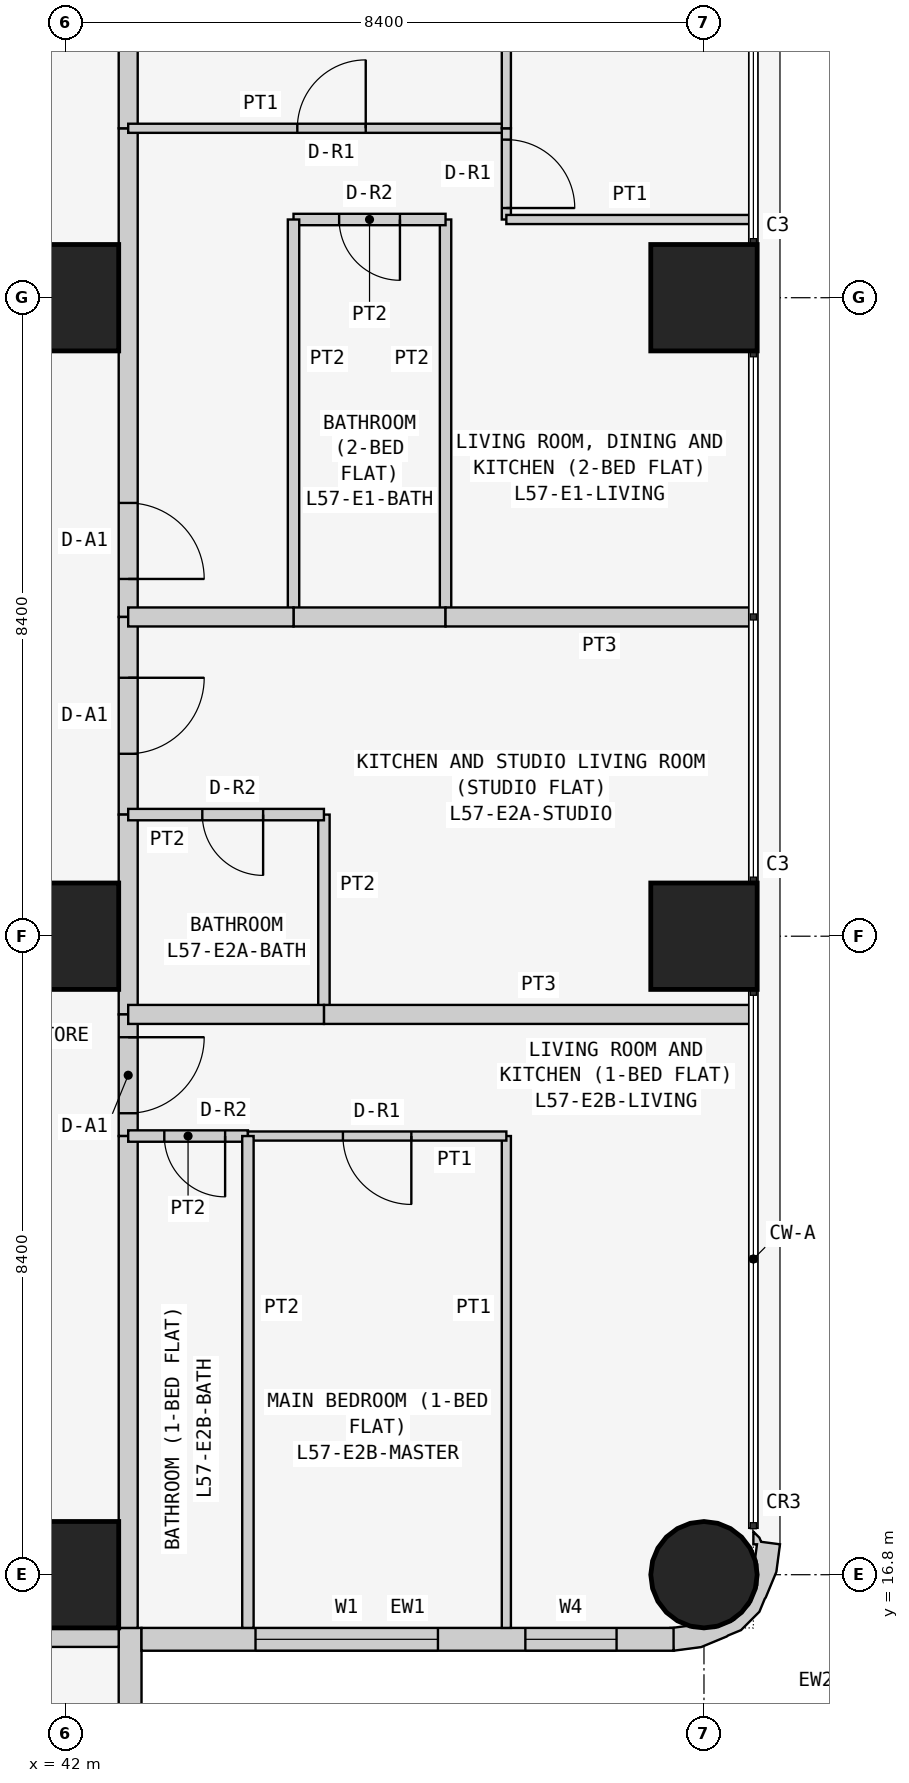
"""IFC4 building model, lengths in metres.
Left out: names, types, materials, properties, quantities, classifications, styles, units other than length and angle.
Written with IfcOpenShell. Run it as: python <this file> out.ifc"""

import sys

from ifc_helpers import new_model, si_unit, direction, frame, frame_2d, origin, origin_2d, place, context, subcontext, project, spatial, polyline, rectangle, circle, outline, extrude, element, fill, save


model = new_model("IFC4")
c1 = context("Model", 3, precision=1e-05, world=origin(), true_north=direction((0.0, 1.0)))
c2 = subcontext(c1, "Body", "Model", "MODEL_VIEW")
j1 = project(units=[si_unit("LENGTHUNIT", "METRE"), si_unit("PLANEANGLEUNIT", "RADIAN")], contexts=[c1])
p1 = place(None, origin())
s1 = spatial("IfcSite", under=j1, at=p1, CompositionType="ELEMENT")
p2 = place(p1, origin())
s2 = spatial("IfcBuilding", under=s1, at=p2, CompositionType="ELEMENT")
p3 = place(p2, frame((0.0, 0.0, 219.3)))
s3 = spatial("IfcBuildingStorey", under=s2, at=p3, CompositionType="ELEMENT", Elevation=219.3)
for number, where, z_axis, x_axis in (
    (1, (42.0, 16.8, 0.0), (0.0, 0.0, 1.0), (1.0, 0.0, 0.0)),
    (2, (42.0, 25.2, 0.0), (0.0, 0.0, 1.0), (1.0, 0.0, 0.0)),
    (3, (42.0, 33.6, 0.0), (0.0, 0.0, 1.0), (1.0, 0.0, 0.0)),
):
    element("IfcColumn", number, at=place(p3, frame(where, z_axis=z_axis, x_axis=x_axis)), inside=s3, PredefinedType="COLUMN", context=c2, shape_type="SweptSolid", body=[
        extrude(rectangle(XDim=1.4, YDim=1.4, at=origin_2d()), origin(), (0.0, 0.0, 1.0), 3.6),
    ])
p4 = place(p3, frame((50.4, 16.8, 0.0), z_axis=(0.0, 0.0, 1.0), x_axis=(1.0, 0.0, 0.0)))
e4 = element("IfcColumn", 4, at=p4, inside=s3, PredefinedType="COLUMN", context=c2, shape_type="SweptSolid", body=[
    extrude(circle(Radius=0.7, at=origin_2d()), origin(), (0.0, 0.0, 1.0), 3.6),
])
for number, where, z_axis, x_axis in (
    (5, (50.4, 25.2, 0.0), (0.0, 0.0, 1.0), (1.0, 0.0, 0.0)),
    (6, (50.4, 33.6, 0.0), (0.0, 0.0, 1.0), (1.0, 0.0, 0.0)),
):
    element("IfcColumn", number, at=place(p3, frame(where, z_axis=z_axis, x_axis=x_axis)), inside=s3, PredefinedType="COLUMN", context=c2, shape_type="SweptSolid", body=[
        extrude(rectangle(XDim=1.4, YDim=1.4, at=origin_2d()), origin(), (0.0, 0.0, 1.0), 3.6),
    ])
p5 = place(p3, frame((42.85, 8.8, 0.0), z_axis=(0.0, 0.0, 1.0), x_axis=(0.0, 1.0, 0.0)))
e7 = element("IfcWall", 7, at=p5, inside=s3, PredefinedType="SOLIDWALL", context=c2, shape_type="SweptSolid", body=[
    extrude(rectangle(XDim=7.3, YDim=0.3, at=frame_2d((3.65, 0.0))), origin(), (0.0, 0.0, 1.0), 3.45),
])
p6 = place(p5, frame((3.1, 0.0, 0.9)))
e8 = element("IfcOpeningElement", 8, at=p6, cuts=e7, PredefinedType="OPENING", context=c2, shape_type="SweptSolid", body=[
    extrude(rectangle(XDim=2.4, YDim=1.5, at=frame_2d((1.2, 0.75))), frame((0.0, 0.16, 0.0), z_axis=(0.0, -1.0, 0.0), x_axis=(1.0, 0.0, 0.0)), (0.0, 0.0, 1.0), 0.32),
])
p7 = place(p5, frame((0.75, 0.0, 0.9)))
e9 = element("IfcOpeningElement", 9, at=p7, cuts=e7, PredefinedType="OPENING", context=c2, shape_type="SweptSolid", body=[
    extrude(rectangle(XDim=1.2, YDim=1.5, at=frame_2d((0.6, 0.75))), frame((0.0, 0.16, 0.0), z_axis=(0.0, -1.0, 0.0), x_axis=(1.0, 0.0, 0.0)), (0.0, 0.0, 1.0), 0.32),
])
p8 = place(p3, frame((43.0, 15.95, 0.0), z_axis=(0.0, 0.0, 1.0), x_axis=(1.0, 0.0, 0.0)))
e10 = element("IfcWall", 10, at=p8, inside=s3, PredefinedType="SOLIDWALL", context=c2, shape_type="SweptSolid", body=[
    extrude(rectangle(XDim=7.0, YDim=0.3, at=frame_2d((3.5, 0.0))), origin(), (0.0, 0.0, 1.0), 3.45),
])
p9 = place(p8, frame((1.5, 0.0, 0.9)))
e11 = element("IfcOpeningElement", 11, at=p9, cuts=e10, PredefinedType="OPENING", context=c2, shape_type="SweptSolid", body=[
    extrude(rectangle(XDim=2.4, YDim=1.5, at=frame_2d((1.2, 0.75))), frame((0.0, 0.16, 0.0), z_axis=(0.0, -1.0, 0.0), x_axis=(1.0, 0.0, 0.0)), (0.0, 0.0, 1.0), 0.32),
])
p10 = place(p8, frame((5.05, 0.0, 0.9)))
e12 = element("IfcOpeningElement", 12, at=p10, cuts=e10, PredefinedType="OPENING", context=c2, shape_type="SweptSolid", body=[
    extrude(rectangle(XDim=1.2, YDim=1.5, at=frame_2d((0.6, 0.75))), frame((0.0, 0.16, 0.0), z_axis=(0.0, -1.0, 0.0), x_axis=(1.0, 0.0, 0.0)), (0.0, 0.0, 1.0), 0.32),
])
p11 = place(p3, frame((50.11, 16.076, 0.0), z_axis=(0.0, 0.0, 1.0), x_axis=(0.898030234854, -0.439933741929, 0.0)))
e13 = element("IfcWall", 13, at=p11, inside=s3, PredefinedType="SOLIDWALL", context=c2, shape_type="SweptSolid", body=[
    extrude(outline(polyline([(0.664, 1.577), (0.426, 1.497), (0.382, 1.536), (0.276, 1.572), (0.349, 1.423), (0.392, 1.444), (0.453, 1.261), (0.51, 1.211), (0.632, 0.961), (0.65, 0.683), (0.56, 0.419), (0.375, 0.21), (0.125, 0.087), (0.05, 0.082), (-0.128, -0.035), (-0.145, -0.044), (0.022, -0.296), (0.327, -0.094), (0.568, 0.18), (0.577, 0.199), (0.7, 0.337), (0.811, 0.661), (0.799, 0.846), (0.803, 0.866), (0.78, 1.231), (0.664, 1.577)])), origin(), (0.0, 0.0, 1.0), 3.45),
])
p12 = place(p3, frame((42.825, 35.829, 0.0), z_axis=(0.0, 0.0, 1.0), x_axis=(0.0, -1.0, 0.0)))
e14 = element("IfcWall", 14, at=p12, inside=s3, PredefinedType="PARTITIONING", context=c2, shape_type="SweptSolid", body=[
    extrude(rectangle(XDim=6.429, YDim=0.25, at=frame_2d((3.215, 0.0))), origin(), (0.0, 0.0, 1.0), 3.45),
])
p13 = place(p12, frame((4.929, 0.0, 0.0)))
e15 = element("IfcOpeningElement", 15, at=p13, cuts=e14, PredefinedType="OPENING", context=c2, shape_type="SweptSolid", body=[
    extrude(rectangle(XDim=1.0, YDim=2.1, at=frame_2d((0.5, 1.05))), frame((0.0, 0.135, 0.0), z_axis=(0.0, -1.0, 0.0), x_axis=(1.0, 0.0, 0.0)), (0.0, 0.0, 1.0), 0.27),
])
p14 = place(p3, frame((42.825, 42.7, 0.0), z_axis=(0.0, 0.0, 1.0), x_axis=(0.0, -1.0, 0.0)))
e16 = element("IfcWall", 16, at=p14, inside=s3, PredefinedType="PARTITIONING", context=c2, shape_type="SweptSolid", body=[
    extrude(rectangle(XDim=6.871, YDim=0.25, at=frame_2d((3.436, 0.0))), origin(), (0.0, 0.0, 1.0), 3.45),
])
p15 = place(p3, frame((42.825, 29.4, 0.0), z_axis=(0.0, 0.0, 1.0), x_axis=(0.0, -1.0, 0.0)))
e17 = element("IfcWall", 17, at=p15, inside=s3, PredefinedType="PARTITIONING", context=c2, shape_type="SweptSolid", body=[
    extrude(rectangle(XDim=2.6, YDim=0.25, at=frame_2d((1.3, 0.0))), origin(), (0.0, 0.0, 1.0), 3.45),
])
p16 = place(p15, frame((0.8, 0.0, 0.0)))
e18 = element("IfcOpeningElement", 18, at=p16, cuts=e17, PredefinedType="OPENING", context=c2, shape_type="SweptSolid", body=[
    extrude(rectangle(XDim=1.0, YDim=2.1, at=frame_2d((0.5, 1.05))), frame((0.0, 0.135, 0.0), z_axis=(0.0, -1.0, 0.0), x_axis=(1.0, 0.0, 0.0)), (0.0, 0.0, 1.0), 0.27),
])
p17 = place(p3, frame((42.825, 26.8, 0.0), z_axis=(0.0, 0.0, 1.0), x_axis=(0.0, -1.0, 0.0)))
e19 = element("IfcWall", 19, at=p17, inside=s3, PredefinedType="PARTITIONING", context=c2, shape_type="SweptSolid", body=[
    extrude(rectangle(XDim=2.629, YDim=0.25, at=frame_2d((1.314, 0.0))), origin(), (0.0, 0.0, 1.0), 3.45),
])
p18 = place(p3, frame((42.825, 24.171, 0.0), z_axis=(0.0, 0.0, 1.0), x_axis=(0.0, -1.0, 0.0)))
e20 = element("IfcWall", 20, at=p18, inside=s3, PredefinedType="PARTITIONING", context=c2, shape_type="SweptSolid", body=[
    extrude(rectangle(XDim=1.6, YDim=0.25, at=frame_2d((0.8, 0.0))), origin(), (0.0, 0.0, 1.0), 3.45),
])
p19 = place(p18, frame((0.3, 0.0, 0.0)))
e21 = element("IfcOpeningElement", 21, at=p19, cuts=e20, PredefinedType="OPENING", context=c2, shape_type="SweptSolid", body=[
    extrude(rectangle(XDim=1.0, YDim=2.1, at=frame_2d((0.5, 1.05))), frame((0.0, 0.135, 0.0), z_axis=(0.0, -1.0, 0.0), x_axis=(1.0, 0.0, 0.0)), (0.0, 0.0, 1.0), 0.27),
])
p20 = place(p3, frame((42.825, 22.571, 0.0), z_axis=(0.0, 0.0, 1.0), x_axis=(0.0, -1.0, 0.0)))
e22 = element("IfcWall", 22, at=p20, inside=s3, PredefinedType="PARTITIONING", context=c2, shape_type="SweptSolid", body=[
    extrude(rectangle(XDim=6.471, YDim=0.25, at=frame_2d((3.235, 0.0))), origin(), (0.0, 0.0, 1.0), 3.45),
])
p21 = place(p3, frame((42.7, 15.975, 0.0), z_axis=(0.0, 0.0, 1.0), x_axis=(-1.0, 0.0, 0.0)))
e23 = element("IfcWall", 23, at=p21, inside=s3, PredefinedType="PARTITIONING", context=c2, shape_type="SweptSolid", body=[
    extrude(rectangle(XDim=6.871, YDim=0.25, at=frame_2d((3.436, 0.0))), origin(), (0.0, 0.0, 1.0), 3.45),
])
p22 = place(p3, frame((47.0, 29.4, 0.0), z_axis=(0.0, 0.0, 1.0), x_axis=(0.0, 1.0, 0.0)))
e24 = element("IfcWall", 24, at=p22, inside=s3, PredefinedType="PARTITIONING", context=c2, shape_type="SweptSolid", body=[
    extrude(rectangle(XDim=5.229, YDim=0.15, at=frame_2d((2.615, 0.0))), origin(), (0.0, 0.0, 1.0), 3.45),
])
p23 = place(p3, frame((47.0, 34.629, 0.0), z_axis=(0.0, 0.0, 1.0), x_axis=(-1.0, 0.0, 0.0)))
e25 = element("IfcWall", 25, at=p23, inside=s3, PredefinedType="PARTITIONING", context=c2, shape_type="SweptSolid", body=[
    extrude(rectangle(XDim=2.0, YDim=0.15, at=frame_2d((1.0, 0.0))), origin(), (0.0, 0.0, 1.0), 3.45),
])
p24 = place(p23, frame((0.6, 0.0, 0.0)))
e26 = element("IfcOpeningElement", 26, at=p24, cuts=e25, PredefinedType="OPENING", context=c2, shape_type="SweptSolid", body=[
    extrude(rectangle(XDim=0.8, YDim=2.1, at=frame_2d((0.4, 1.05))), frame((0.0, 0.085, 0.0), z_axis=(0.0, -1.0, 0.0), x_axis=(1.0, 0.0, 0.0)), (0.0, 0.0, 1.0), 0.17),
])
p25 = place(p3, frame((45.0, 34.629, 0.0), z_axis=(0.0, 0.0, 1.0), x_axis=(0.0, -1.0, 0.0)))
e27 = element("IfcWall", 27, at=p25, inside=s3, PredefinedType="PARTITIONING", context=c2, shape_type="SweptSolid", body=[
    extrude(rectangle(XDim=5.229, YDim=0.15, at=frame_2d((2.615, 0.0))), origin(), (0.0, 0.0, 1.0), 3.45),
])
p26 = place(p3, frame((45.0, 29.4, 0.0), z_axis=(0.0, 0.0, 1.0), x_axis=(1.0, 0.0, 0.0)))
e28 = element("IfcWall", 28, at=p26, inside=s3, PredefinedType="PARTITIONING", context=c2, shape_type="SweptSolid", body=[
    extrude(rectangle(XDim=2.0, YDim=0.25, at=frame_2d((1.0, 0.0))), origin(), (0.0, 0.0, 1.0), 3.45),
])
p27 = place(p3, frame((42.825, 35.829, 0.0), z_axis=(0.0, 0.0, 1.0), x_axis=(1.0, 0.0, 0.0)))
e29 = element("IfcWall", 29, at=p27, inside=s3, PredefinedType="PARTITIONING", context=c2, shape_type="SweptSolid", body=[
    extrude(rectangle(XDim=4.975, YDim=0.12, at=frame_2d((2.488, 0.0))), origin(), (0.0, 0.0, 1.0), 3.45),
])
p28 = place(p27, frame((2.225, 0.0, 0.0)))
e30 = element("IfcOpeningElement", 30, at=p28, cuts=e29, PredefinedType="OPENING", context=c2, shape_type="SweptSolid", body=[
    extrude(rectangle(XDim=0.9, YDim=2.1, at=frame_2d((0.45, 1.05))), frame((0.0, 0.07, 0.0), z_axis=(0.0, -1.0, 0.0), x_axis=(1.0, 0.0, 0.0)), (0.0, 0.0, 1.0), 0.14),
])
p29 = place(p3, frame((47.8, 35.829, 0.0), z_axis=(0.0, 0.0, 1.0), x_axis=(0.0, -1.0, 0.0)))
e31 = element("IfcWall", 31, at=p29, inside=s3, PredefinedType="PARTITIONING", context=c2, shape_type="SweptSolid", body=[
    extrude(rectangle(XDim=1.2, YDim=0.12, at=frame_2d((0.6, 0.0))), origin(), (0.0, 0.0, 1.0), 3.45),
])
p30 = place(p29, frame((0.149, 0.0, 0.0)))
e32 = element("IfcOpeningElement", 32, at=p30, cuts=e31, PredefinedType="OPENING", context=c2, shape_type="SweptSolid", body=[
    extrude(rectangle(XDim=0.9, YDim=2.1, at=frame_2d((0.45, 1.05))), frame((0.0, 0.07, 0.0), z_axis=(0.0, -1.0, 0.0), x_axis=(1.0, 0.0, 0.0)), (0.0, 0.0, 1.0), 0.14),
])
p31 = place(p3, frame((47.8, 34.629, 0.0), z_axis=(0.0, 0.0, 1.0), x_axis=(1.0, 0.0, 0.0)))
e33 = element("IfcWall", 33, at=p31, inside=s3, PredefinedType="PARTITIONING", context=c2, shape_type="SweptSolid", body=[
    extrude(rectangle(XDim=3.25, YDim=0.12, at=frame_2d((1.625, 0.0))), origin(), (0.0, 0.0, 1.0), 3.45),
])
p32 = place(p3, frame((45.0, 29.4, 0.0), z_axis=(0.0, 0.0, 1.0), x_axis=(-1.0, 0.0, 0.0)))
e34 = element("IfcWall", 34, at=p32, inside=s3, PredefinedType="PARTITIONING", context=c2, shape_type="SweptSolid", body=[
    extrude(rectangle(XDim=2.175, YDim=0.25, at=frame_2d((1.087, 0.0))), origin(), (0.0, 0.0, 1.0), 3.45),
])
p33 = place(p3, frame((51.05, 29.4, 0.0), z_axis=(0.0, 0.0, 1.0), x_axis=(-1.0, 0.0, 0.0)))
e35 = element("IfcWall", 35, at=p33, inside=s3, PredefinedType="PARTITIONING", context=c2, shape_type="SweptSolid", body=[
    extrude(rectangle(XDim=4.05, YDim=0.25, at=frame_2d((2.025, 0.0))), origin(), (0.0, 0.0, 1.0), 3.45),
])
p34 = place(p3, frame((47.8, 35.829, 0.0), z_axis=(0.0, 0.0, 1.0), x_axis=(0.0, 1.0, 0.0)))
e36 = element("IfcWall", 36, at=p34, inside=s3, PredefinedType="PARTITIONING", context=c2, shape_type="SweptSolid", body=[
    extrude(rectangle(XDim=6.871, YDim=0.12, at=frame_2d((3.436, 0.0))), origin(), (0.0, 0.0, 1.0), 3.45),
])
p35 = place(p3, frame((45.4, 24.171, 0.0), z_axis=(0.0, 0.0, 1.0), x_axis=(0.0, 1.0, 0.0)))
e37 = element("IfcWall", 37, at=p35, inside=s3, PredefinedType="PARTITIONING", context=c2, shape_type="SweptSolid", body=[
    extrude(rectangle(XDim=2.629, YDim=0.15, at=frame_2d((1.314, 0.0))), origin(), (0.0, 0.0, 1.0), 3.45),
])
p36 = place(p3, frame((45.4, 26.8, 0.0), z_axis=(0.0, 0.0, 1.0), x_axis=(-1.0, 0.0, 0.0)))
e38 = element("IfcWall", 38, at=p36, inside=s3, PredefinedType="PARTITIONING", context=c2, shape_type="SweptSolid", body=[
    extrude(rectangle(XDim=2.575, YDim=0.15, at=frame_2d((1.288, 0.0))), origin(), (0.0, 0.0, 1.0), 3.45),
])
p37 = place(p36, frame((0.8, 0.0, 0.0)))
e39 = element("IfcOpeningElement", 39, at=p37, cuts=e38, PredefinedType="OPENING", context=c2, shape_type="SweptSolid", body=[
    extrude(rectangle(XDim=0.8, YDim=2.1, at=frame_2d((0.4, 1.05))), frame((0.0, 0.085, 0.0), z_axis=(0.0, -1.0, 0.0), x_axis=(1.0, 0.0, 0.0)), (0.0, 0.0, 1.0), 0.17),
])
p38 = place(p3, frame((51.05, 24.171, 0.0), z_axis=(0.0, 0.0, 1.0), x_axis=(-1.0, 0.0, 0.0)))
e40 = element("IfcWall", 40, at=p38, inside=s3, PredefinedType="PARTITIONING", context=c2, shape_type="SweptSolid", body=[
    extrude(rectangle(XDim=5.65, YDim=0.25, at=frame_2d((2.825, 0.0))), origin(), (0.0, 0.0, 1.0), 3.45),
])
p39 = place(p3, frame((45.4, 24.171, 0.0), z_axis=(0.0, 0.0, 1.0), x_axis=(-1.0, 0.0, 0.0)))
e41 = element("IfcWall", 41, at=p39, inside=s3, PredefinedType="PARTITIONING", context=c2, shape_type="SweptSolid", body=[
    extrude(rectangle(XDim=2.575, YDim=0.25, at=frame_2d((1.288, 0.0))), origin(), (0.0, 0.0, 1.0), 3.45),
])
p40 = place(p3, frame((44.4, 22.571, 0.0), z_axis=(0.0, 0.0, 1.0), x_axis=(-1.0, 0.0, 0.0)))
e42 = element("IfcWall", 42, at=p40, inside=s3, PredefinedType="PARTITIONING", context=c2, shape_type="SweptSolid", body=[
    extrude(rectangle(XDim=1.575, YDim=0.15, at=frame_2d((0.788, 0.0))), origin(), (0.0, 0.0, 1.0), 3.45),
])
p41 = place(p40, frame((0.3, 0.0, 0.0)))
e43 = element("IfcOpeningElement", 43, at=p41, cuts=e42, PredefinedType="OPENING", context=c2, shape_type="SweptSolid", body=[
    extrude(rectangle(XDim=0.8, YDim=2.1, at=frame_2d((0.4, 1.05))), frame((0.0, 0.085, 0.0), z_axis=(0.0, -1.0, 0.0), x_axis=(1.0, 0.0, 0.0)), (0.0, 0.0, 1.0), 0.17),
])
p42 = place(p3, frame((47.8, 16.1, 0.0), z_axis=(0.0, 0.0, 1.0), x_axis=(0.0, 1.0, 0.0)))
e44 = element("IfcWall", 44, at=p42, inside=s3, PredefinedType="PARTITIONING", context=c2, shape_type="SweptSolid", body=[
    extrude(rectangle(XDim=6.471, YDim=0.12, at=frame_2d((3.235, 0.0))), origin(), (0.0, 0.0, 1.0), 3.45),
])
p43 = place(p3, frame((47.8, 22.571, 0.0), z_axis=(0.0, 0.0, 1.0), x_axis=(-1.0, 0.0, 0.0)))
e45 = element("IfcWall", 45, at=p43, inside=s3, PredefinedType="PARTITIONING", context=c2, shape_type="SweptSolid", body=[
    extrude(rectangle(XDim=3.4, YDim=0.12, at=frame_2d((1.7, 0.0))), origin(), (0.0, 0.0, 1.0), 3.45),
])
p44 = place(p43, frame((1.25, 0.0, 0.0)))
e46 = element("IfcOpeningElement", 46, at=p44, cuts=e45, PredefinedType="OPENING", context=c2, shape_type="SweptSolid", body=[
    extrude(rectangle(XDim=0.9, YDim=2.1, at=frame_2d((0.45, 1.05))), frame((0.0, 0.07, 0.0), z_axis=(0.0, -1.0, 0.0), x_axis=(1.0, 0.0, 0.0)), (0.0, 0.0, 1.0), 0.14),
])
p45 = place(p3, frame((44.4, 22.571, 0.0), z_axis=(0.0, 0.0, 1.0), x_axis=(0.0, -1.0, 0.0)))
e47 = element("IfcWall", 47, at=p45, inside=s3, PredefinedType="PARTITIONING", context=c2, shape_type="SweptSolid", body=[
    extrude(rectangle(XDim=6.471, YDim=0.15, at=frame_2d((3.235, 0.0))), origin(), (0.0, 0.0, 1.0), 3.45),
])
p46 = place(p9, origin())
e48 = element("IfcWindow", 48, at=p46, inside=s3, PartitioningType="SINGLE_PANEL", PredefinedType="WINDOW", context=c2, shape_type="SweptSolid", body=[
    extrude(rectangle(XDim=2.4, YDim=1.5, at=frame_2d((1.2, 0.75))), frame((0.0, 0.03, 0.0), z_axis=(0.0, -1.0, 0.0), x_axis=(1.0, 0.0, 0.0)), (0.0, 0.0, 1.0), 0.06),
])
fill(e11, e48)
p47 = place(p10, origin())
e49 = element("IfcWindow", 49, at=p47, inside=s3, PartitioningType="SINGLE_PANEL", PredefinedType="WINDOW", context=c2, shape_type="SweptSolid", body=[
    extrude(rectangle(XDim=1.2, YDim=1.5, at=frame_2d((0.6, 0.75))), frame((0.0, 0.03, 0.0), z_axis=(0.0, -1.0, 0.0), x_axis=(1.0, 0.0, 0.0)), (0.0, 0.0, 1.0), 0.06),
])
fill(e12, e49)
p48 = place(p13, origin())
e50 = element("IfcDoor", 50, at=p48, inside=s3, OperationType="SINGLE_SWING_RIGHT", PredefinedType="DOOR", context=c2, shape_type="SweptSolid", body=[
    extrude(rectangle(XDim=1.0, YDim=2.1, at=frame_2d((0.5, 1.05))), frame((0.0, 0.025, 0.0), z_axis=(0.0, -1.0, 0.0), x_axis=(1.0, 0.0, 0.0)), (0.0, 0.0, 1.0), 0.05),
])
fill(e15, e50)
p49 = place(p24, origin())
e51 = element("IfcDoor", 51, at=p49, inside=s3, OperationType="SINGLE_SWING_LEFT", PredefinedType="DOOR", context=c2, shape_type="SweptSolid", body=[
    extrude(rectangle(XDim=0.8, YDim=2.1, at=frame_2d((0.4, 1.05))), frame((0.0, 0.025, 0.0), z_axis=(0.0, -1.0, 0.0), x_axis=(1.0, 0.0, 0.0)), (0.0, 0.0, 1.0), 0.05),
])
fill(e26, e51)
p50 = place(p28, origin())
e52 = element("IfcDoor", 52, at=p50, inside=s3, OperationType="SINGLE_SWING_RIGHT", PredefinedType="DOOR", context=c2, shape_type="SweptSolid", body=[
    extrude(rectangle(XDim=0.9, YDim=2.1, at=frame_2d((0.45, 1.05))), frame((0.0, 0.025, 0.0), z_axis=(0.0, -1.0, 0.0), x_axis=(1.0, 0.0, 0.0)), (0.0, 0.0, 1.0), 0.05),
])
fill(e30, e52)
p51 = place(p30, origin())
e53 = element("IfcDoor", 53, at=p51, inside=s3, OperationType="SINGLE_SWING_RIGHT", PredefinedType="DOOR", context=c2, shape_type="SweptSolid", body=[
    extrude(rectangle(XDim=0.9, YDim=2.1, at=frame_2d((0.45, 1.05))), frame((0.0, 0.025, 0.0), z_axis=(0.0, -1.0, 0.0), x_axis=(1.0, 0.0, 0.0)), (0.0, 0.0, 1.0), 0.05),
])
fill(e32, e53)
p52 = place(p16, origin())
e54 = element("IfcDoor", 54, at=p52, inside=s3, OperationType="SINGLE_SWING_LEFT", PredefinedType="DOOR", context=c2, shape_type="SweptSolid", body=[
    extrude(rectangle(XDim=1.0, YDim=2.1, at=frame_2d((0.5, 1.05))), frame((0.0, 0.025, 0.0), z_axis=(0.0, -1.0, 0.0), x_axis=(1.0, 0.0, 0.0)), (0.0, 0.0, 1.0), 0.05),
])
fill(e18, e54)
p53 = place(p37, origin())
e55 = element("IfcDoor", 55, at=p53, inside=s3, OperationType="SINGLE_SWING_LEFT", PredefinedType="DOOR", context=c2, shape_type="SweptSolid", body=[
    extrude(rectangle(XDim=0.8, YDim=2.1, at=frame_2d((0.4, 1.05))), frame((0.0, 0.025, 0.0), z_axis=(0.0, -1.0, 0.0), x_axis=(1.0, 0.0, 0.0)), (0.0, 0.0, 1.0), 0.05),
])
fill(e39, e55)
p54 = place(p19, origin())
e56 = element("IfcDoor", 56, at=p54, inside=s3, OperationType="SINGLE_SWING_LEFT", PredefinedType="DOOR", context=c2, shape_type="SweptSolid", body=[
    extrude(rectangle(XDim=1.0, YDim=2.1, at=frame_2d((0.5, 1.05))), frame((0.0, 0.025, 0.0), z_axis=(0.0, -1.0, 0.0), x_axis=(1.0, 0.0, 0.0)), (0.0, 0.0, 1.0), 0.05),
])
fill(e21, e56)
p55 = place(p41, origin())
e57 = element("IfcDoor", 57, at=p55, inside=s3, OperationType="SINGLE_SWING_LEFT", PredefinedType="DOOR", context=c2, shape_type="SweptSolid", body=[
    extrude(rectangle(XDim=0.8, YDim=2.1, at=frame_2d((0.4, 1.05))), frame((0.0, 0.025, 0.0), z_axis=(0.0, -1.0, 0.0), x_axis=(1.0, 0.0, 0.0)), (0.0, 0.0, 1.0), 0.05),
])
fill(e43, e57)
p56 = place(p44, origin())
e58 = element("IfcDoor", 58, at=p56, inside=s3, OperationType="SINGLE_SWING_LEFT", PredefinedType="DOOR", context=c2, shape_type="SweptSolid", body=[
    extrude(rectangle(XDim=0.9, YDim=2.1, at=frame_2d((0.45, 1.05))), frame((0.0, 0.025, 0.0), z_axis=(0.0, -1.0, 0.0), x_axis=(1.0, 0.0, 0.0)), (0.0, 0.0, 1.0), 0.05),
])
fill(e46, e58)
save(model, sys.argv[1])
